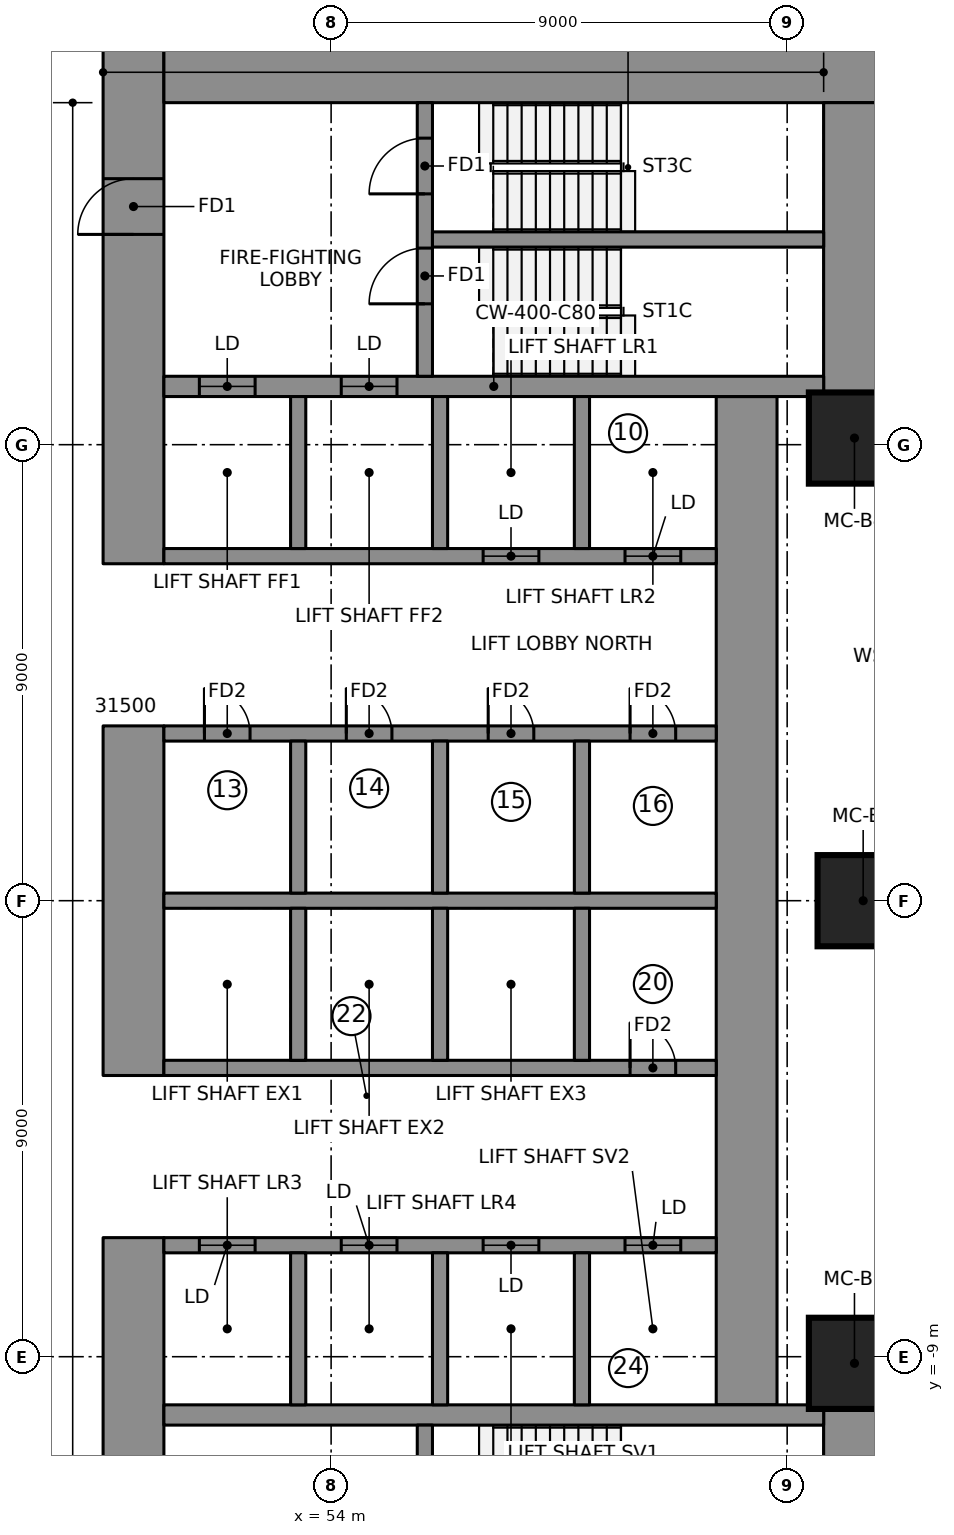
"""IFC4 building model, lengths in metres.
Left out: names, types, materials, properties, quantities, classifications, styles, units other than length and angle.
Written with IfcOpenShell. Run it as: python <this file> out.ifc"""

import sys

from ifc_helpers import new_model, si_unit, direction, frame, frame_2d, origin, origin_2d, place, context, subcontext, project, spatial, rectangle, extrude, element, fill, save


model = new_model("IFC4")
c1 = context("Model", 3, precision=1e-05, world=origin(), true_north=direction((0.0, 1.0)))
c2 = subcontext(c1, "Body", "Model", "MODEL_VIEW")
j1 = project(units=[si_unit("LENGTHUNIT", "METRE"), si_unit("PLANEANGLEUNIT", "RADIAN")], contexts=[c1])
p1 = place(None, origin())
s1 = spatial("IfcSite", under=j1, at=p1, CompositionType="ELEMENT")
p2 = place(p1, origin())
s2 = spatial("IfcBuilding", under=s1, at=p2, CompositionType="ELEMENT")
p3 = place(p2, frame((0.0, 0.0, 43.15)))
s3 = spatial("IfcBuildingStorey", under=s2, at=p3, CompositionType="ELEMENT", Elevation=43.15)
p4 = place(p3, frame((50.1, 6.65, 0.0), z_axis=(0.0, 0.0, 1.0), x_axis=(0.0, 1.0, 0.0)))
e1 = element("IfcWall", 1, at=p4, inside=s3, PredefinedType="SHEAR", context=c2, shape_type="SweptSolid", body=[
    extrude(rectangle(XDim=10.3, YDim=1.2, at=frame_2d((5.15, 0.0))), origin(), (0.0, 0.0, 1.0), 3.55),
])
p5 = place(p4, frame((6.5, 0.0, 0.0)))
e2 = element("IfcOpeningElement", 2, at=p5, cuts=e1, PredefinedType="OPENING", context=c2, shape_type="SweptSolid", body=[
    extrude(rectangle(XDim=1.1, YDim=2.1, at=frame_2d((0.55, 1.05))), frame((0.0, 0.61, 0.0), z_axis=(0.0, -1.0, 0.0), x_axis=(1.0, 0.0, 0.0)), (0.0, 0.0, 1.0), 1.22),
])
p6 = place(p3, frame((50.1, -3.45, 0.0), z_axis=(0.0, 0.0, 1.0), x_axis=(0.0, 1.0, 0.0)))
e3 = element("IfcWall", 3, at=p6, inside=s3, PredefinedType="SHEAR", context=c2, shape_type="SweptSolid", body=[
    extrude(rectangle(XDim=6.9, YDim=1.2, at=frame_2d((3.45, 0.0))), origin(), (0.0, 0.0, 1.0), 3.55),
])
p7 = place(p3, frame((50.1, -16.95, 0.0), z_axis=(0.0, 0.0, 1.0), x_axis=(0.0, 1.0, 0.0)))
e4 = element("IfcWall", 4, at=p7, inside=s3, PredefinedType="SHEAR", context=c2, shape_type="SweptSolid", body=[
    extrude(rectangle(XDim=10.3, YDim=1.2, at=frame_2d((5.15, 0.0))), origin(), (0.0, 0.0, 1.0), 3.55),
])
p8 = place(p7, frame((2.7, 0.0, 0.0)))
e5 = element("IfcOpeningElement", 5, at=p8, cuts=e4, PredefinedType="OPENING", context=c2, shape_type="SweptSolid", body=[
    extrude(rectangle(XDim=1.1, YDim=2.1, at=frame_2d((0.55, 1.05))), frame((0.0, 0.61, 0.0), z_axis=(0.0, -1.0, 0.0), x_axis=(1.0, 0.0, 0.0)), (0.0, 0.0, 1.0), 1.22),
])
p9 = place(p3, frame((50.7, 16.35, 0.0), z_axis=(0.0, 0.0, 1.0), x_axis=(1.0, 0.0, 0.0)))
e6 = element("IfcWall", 6, at=p9, inside=s3, PredefinedType="SHEAR", context=c2, shape_type="SweptSolid", body=[
    extrude(rectangle(XDim=14.22, YDim=1.2, at=frame_2d((7.11, 0.0))), origin(), (0.0, 0.0, 1.0), 3.55),
])
for number, where, z_axis, x_axis in (
    (7, (64.32, 9.95, 0.0), (0.0, 0.0, 1.0), (0.0, 1.0, 0.0)),
    (8, (64.32, -15.75, 0.0), (0.0, 0.0, 1.0), (0.0, 1.0, 0.0)),
):
    element("IfcWall", number, at=place(p3, frame(where, z_axis=z_axis, x_axis=x_axis)), inside=s3, PredefinedType="SHEAR", context=c2, shape_type="SweptSolid", body=[
        extrude(rectangle(XDim=5.8, YDim=1.2, at=frame_2d((2.9, 0.0))), origin(), (0.0, 0.0, 1.0), 3.55),
    ])
p10 = place(p3, frame((62.2, -9.95, 0.0), z_axis=(0.0, 0.0, 1.0), x_axis=(0.0, 1.0, 0.0)))
e9 = element("IfcWall", 9, at=p10, inside=s3, PredefinedType="SHEAR", context=c2, shape_type="SweptSolid", body=[
    extrude(rectangle(XDim=19.9, YDim=1.2, at=frame_2d((9.95, 0.0))), origin(), (0.0, 0.0, 1.0), 3.55),
])
p11 = place(p3, frame((50.7, 10.15, 0.0), z_axis=(0.0, 0.0, 1.0), x_axis=(1.0, 0.0, 0.0)))
e10 = element("IfcWall", 10, at=p11, inside=s3, PredefinedType="SHEAR", context=c2, shape_type="SweptSolid", body=[
    extrude(rectangle(XDim=13.02, YDim=0.4, at=frame_2d((6.51, 0.0))), origin(), (0.0, 0.0, 1.0), 3.55),
])
p12 = place(p11, frame((0.7, 0.0, 0.0)))
e11 = element("IfcOpeningElement", 11, at=p12, cuts=e10, PredefinedType="OPENING", context=c2, shape_type="SweptSolid", body=[
    extrude(rectangle(XDim=1.1, YDim=2.1, at=frame_2d((0.55, 1.05))), frame((0.0, 0.21, 0.0), z_axis=(0.0, -1.0, 0.0), x_axis=(1.0, 0.0, 0.0)), (0.0, 0.0, 1.0), 0.42),
])
p13 = place(p11, frame((3.5, 0.0, 0.0)))
e12 = element("IfcOpeningElement", 12, at=p13, cuts=e10, PredefinedType="OPENING", context=c2, shape_type="SweptSolid", body=[
    extrude(rectangle(XDim=1.1, YDim=2.1, at=frame_2d((0.55, 1.05))), frame((0.0, 0.21, 0.0), z_axis=(0.0, -1.0, 0.0), x_axis=(1.0, 0.0, 0.0)), (0.0, 0.0, 1.0), 0.42),
])
p14 = place(p3, frame((50.7, -10.15, 0.0), z_axis=(0.0, 0.0, 1.0), x_axis=(1.0, 0.0, 0.0)))
e13 = element("IfcWall", 13, at=p14, inside=s3, PredefinedType="SHEAR", context=c2, shape_type="SweptSolid", body=[
    extrude(rectangle(XDim=13.02, YDim=0.4, at=frame_2d((6.51, 0.0))), origin(), (0.0, 0.0, 1.0), 3.55),
])
p15 = place(p3, frame((50.7, 0.0, 0.0), z_axis=(0.0, 0.0, 1.0), x_axis=(1.0, 0.0, 0.0)))
e14 = element("IfcWall", 14, at=p15, inside=s3, PredefinedType="SHEAR", context=c2, shape_type="SweptSolid", body=[
    extrude(rectangle(XDim=10.9, YDim=0.3, at=frame_2d((5.45, 0.0))), origin(), (0.0, 0.0, 1.0), 3.55),
])
p16 = place(p3, frame((50.7, 3.3, 0.0), z_axis=(0.0, 0.0, 1.0), x_axis=(1.0, 0.0, 0.0)))
e15 = element("IfcWall", 15, at=p16, inside=s3, PredefinedType="SHEAR", context=c2, shape_type="SweptSolid", body=[
    extrude(rectangle(XDim=10.9, YDim=0.3, at=frame_2d((5.45, 0.0))), origin(), (0.0, 0.0, 1.0), 3.55),
])
p17 = place(p16, frame((0.8, 0.0, 0.0)))
e16 = element("IfcOpeningElement", 16, at=p17, cuts=e15, PredefinedType="OPENING", context=c2, shape_type="SweptSolid", body=[
    extrude(rectangle(XDim=0.9, YDim=2.1, at=frame_2d((0.45, 1.05))), frame((0.0, 0.16, 0.0), z_axis=(0.0, -1.0, 0.0), x_axis=(1.0, 0.0, 0.0)), (0.0, 0.0, 1.0), 0.32),
])
p18 = place(p16, frame((3.6, 0.0, 0.0)))
e17 = element("IfcOpeningElement", 17, at=p18, cuts=e15, PredefinedType="OPENING", context=c2, shape_type="SweptSolid", body=[
    extrude(rectangle(XDim=0.9, YDim=2.1, at=frame_2d((0.45, 1.05))), frame((0.0, 0.16, 0.0), z_axis=(0.0, -1.0, 0.0), x_axis=(1.0, 0.0, 0.0)), (0.0, 0.0, 1.0), 0.32),
])
p19 = place(p16, frame((6.4, 0.0, 0.0)))
e18 = element("IfcOpeningElement", 18, at=p19, cuts=e15, PredefinedType="OPENING", context=c2, shape_type="SweptSolid", body=[
    extrude(rectangle(XDim=0.9, YDim=2.1, at=frame_2d((0.45, 1.05))), frame((0.0, 0.16, 0.0), z_axis=(0.0, -1.0, 0.0), x_axis=(1.0, 0.0, 0.0)), (0.0, 0.0, 1.0), 0.32),
])
p20 = place(p16, frame((9.2, 0.0, 0.0)))
e19 = element("IfcOpeningElement", 19, at=p20, cuts=e15, PredefinedType="OPENING", context=c2, shape_type="SweptSolid", body=[
    extrude(rectangle(XDim=0.9, YDim=2.1, at=frame_2d((0.45, 1.05))), frame((0.0, 0.16, 0.0), z_axis=(0.0, -1.0, 0.0), x_axis=(1.0, 0.0, 0.0)), (0.0, 0.0, 1.0), 0.32),
])
p21 = place(p3, frame((50.7, 6.8, 0.0), z_axis=(0.0, 0.0, 1.0), x_axis=(1.0, 0.0, 0.0)))
e20 = element("IfcWall", 20, at=p21, inside=s3, PredefinedType="SHEAR", context=c2, shape_type="SweptSolid", body=[
    extrude(rectangle(XDim=10.9, YDim=0.3, at=frame_2d((5.45, 0.0))), origin(), (0.0, 0.0, 1.0), 3.55),
])
p22 = place(p21, frame((6.3, 0.0, 0.0)))
e21 = element("IfcOpeningElement", 21, at=p22, cuts=e20, PredefinedType="OPENING", context=c2, shape_type="SweptSolid", body=[
    extrude(rectangle(XDim=1.1, YDim=2.1, at=frame_2d((0.55, 1.05))), frame((0.0, 0.16, 0.0), z_axis=(0.0, -1.0, 0.0), x_axis=(1.0, 0.0, 0.0)), (0.0, 0.0, 1.0), 0.32),
])
p23 = place(p21, frame((9.1, 0.0, 0.0)))
e22 = element("IfcOpeningElement", 22, at=p23, cuts=e20, PredefinedType="OPENING", context=c2, shape_type="SweptSolid", body=[
    extrude(rectangle(XDim=1.1, YDim=2.1, at=frame_2d((0.55, 1.05))), frame((0.0, 0.16, 0.0), z_axis=(0.0, -1.0, 0.0), x_axis=(1.0, 0.0, 0.0)), (0.0, 0.0, 1.0), 0.32),
])
for number, where, z_axis, x_axis in (
    (23, (53.35, 0.15, 0.0), (0.0, 0.0, 1.0), (0.0, 1.0, 0.0)),
    (24, (53.35, 6.95, 0.0), (0.0, 0.0, 1.0), (0.0, 1.0, 0.0)),
    (25, (56.15, 0.15, 0.0), (0.0, 0.0, 1.0), (0.0, 1.0, 0.0)),
    (26, (56.15, 6.95, 0.0), (0.0, 0.0, 1.0), (0.0, 1.0, 0.0)),
    (27, (58.95, 0.15, 0.0), (0.0, 0.0, 1.0), (0.0, 1.0, 0.0)),
    (28, (58.95, 6.95, 0.0), (0.0, 0.0, 1.0), (0.0, 1.0, 0.0)),
):
    element("IfcWall", number, at=place(p3, frame(where, z_axis=z_axis, x_axis=x_axis)), inside=s3, PredefinedType="SHEAR", context=c2, shape_type="SweptSolid", body=[
        extrude(rectangle(XDim=3.0, YDim=0.3, at=frame_2d((1.5, 0.0))), origin(), (0.0, 0.0, 1.0), 3.55),
    ])
p24 = place(p3, frame((50.7, -3.3, 0.0), z_axis=(0.0, 0.0, 1.0), x_axis=(1.0, 0.0, 0.0)))
e29 = element("IfcWall", 29, at=p24, inside=s3, PredefinedType="SHEAR", context=c2, shape_type="SweptSolid", body=[
    extrude(rectangle(XDim=10.9, YDim=0.3, at=frame_2d((5.45, 0.0))), origin(), (0.0, 0.0, 1.0), 3.55),
])
p25 = place(p24, frame((9.2, 0.0, 0.0)))
e30 = element("IfcOpeningElement", 30, at=p25, cuts=e29, PredefinedType="OPENING", context=c2, shape_type="SweptSolid", body=[
    extrude(rectangle(XDim=0.9, YDim=2.1, at=frame_2d((0.45, 1.05))), frame((0.0, 0.16, 0.0), z_axis=(0.0, -1.0, 0.0), x_axis=(1.0, 0.0, 0.0)), (0.0, 0.0, 1.0), 0.32),
])
p26 = place(p3, frame((50.7, -6.8, 0.0), z_axis=(0.0, 0.0, 1.0), x_axis=(1.0, 0.0, 0.0)))
e31 = element("IfcWall", 31, at=p26, inside=s3, PredefinedType="SHEAR", context=c2, shape_type="SweptSolid", body=[
    extrude(rectangle(XDim=10.9, YDim=0.3, at=frame_2d((5.45, 0.0))), origin(), (0.0, 0.0, 1.0), 3.55),
])
p27 = place(p26, frame((0.7, 0.0, 0.0)))
e32 = element("IfcOpeningElement", 32, at=p27, cuts=e31, PredefinedType="OPENING", context=c2, shape_type="SweptSolid", body=[
    extrude(rectangle(XDim=1.1, YDim=2.1, at=frame_2d((0.55, 1.05))), frame((0.0, 0.16, 0.0), z_axis=(0.0, -1.0, 0.0), x_axis=(1.0, 0.0, 0.0)), (0.0, 0.0, 1.0), 0.32),
])
p28 = place(p26, frame((3.5, 0.0, 0.0)))
e33 = element("IfcOpeningElement", 33, at=p28, cuts=e31, PredefinedType="OPENING", context=c2, shape_type="SweptSolid", body=[
    extrude(rectangle(XDim=1.1, YDim=2.1, at=frame_2d((0.55, 1.05))), frame((0.0, 0.16, 0.0), z_axis=(0.0, -1.0, 0.0), x_axis=(1.0, 0.0, 0.0)), (0.0, 0.0, 1.0), 0.32),
])
p29 = place(p26, frame((6.3, 0.0, 0.0)))
e34 = element("IfcOpeningElement", 34, at=p29, cuts=e31, PredefinedType="OPENING", context=c2, shape_type="SweptSolid", body=[
    extrude(rectangle(XDim=1.1, YDim=2.1, at=frame_2d((0.55, 1.05))), frame((0.0, 0.16, 0.0), z_axis=(0.0, -1.0, 0.0), x_axis=(1.0, 0.0, 0.0)), (0.0, 0.0, 1.0), 0.32),
])
p30 = place(p26, frame((9.1, 0.0, 0.0)))
e35 = element("IfcOpeningElement", 35, at=p30, cuts=e31, PredefinedType="OPENING", context=c2, shape_type="SweptSolid", body=[
    extrude(rectangle(XDim=1.1, YDim=2.1, at=frame_2d((0.55, 1.05))), frame((0.0, 0.16, 0.0), z_axis=(0.0, -1.0, 0.0), x_axis=(1.0, 0.0, 0.0)), (0.0, 0.0, 1.0), 0.32),
])
for number, where, z_axis, x_axis in (
    (36, (53.35, -3.15, 0.0), (0.0, 0.0, 1.0), (0.0, 1.0, 0.0)),
    (37, (53.35, -9.95, 0.0), (0.0, 0.0, 1.0), (0.0, 1.0, 0.0)),
    (38, (56.15, -3.15, 0.0), (0.0, 0.0, 1.0), (0.0, 1.0, 0.0)),
    (39, (56.15, -9.95, 0.0), (0.0, 0.0, 1.0), (0.0, 1.0, 0.0)),
    (40, (58.95, -3.15, 0.0), (0.0, 0.0, 1.0), (0.0, 1.0, 0.0)),
    (41, (58.95, -9.95, 0.0), (0.0, 0.0, 1.0), (0.0, 1.0, 0.0)),
):
    element("IfcWall", number, at=place(p3, frame(where, z_axis=z_axis, x_axis=x_axis)), inside=s3, PredefinedType="SHEAR", context=c2, shape_type="SweptSolid", body=[
        extrude(rectangle(XDim=3.0, YDim=0.3, at=frame_2d((1.5, 0.0))), origin(), (0.0, 0.0, 1.0), 3.55),
    ])
p31 = place(p3, frame((55.85, 10.35, 0.0), z_axis=(0.0, 0.0, 1.0), x_axis=(0.0, 1.0, 0.0)))
e42 = element("IfcWall", 42, at=p31, inside=s3, PredefinedType="SHEAR", context=c2, shape_type="SweptSolid", body=[
    extrude(rectangle(XDim=5.4, YDim=0.3, at=frame_2d((2.7, 0.0))), origin(), (0.0, 0.0, 1.0), 3.55),
])
p32 = place(p31, frame((1.43, 0.0, 0.0)))
e43 = element("IfcOpeningElement", 43, at=p32, cuts=e42, PredefinedType="OPENING", context=c2, shape_type="SweptSolid", body=[
    extrude(rectangle(XDim=1.1, YDim=2.1, at=frame_2d((0.55, 1.05))), frame((0.0, 0.16, 0.0), z_axis=(0.0, -1.0, 0.0), x_axis=(1.0, 0.0, 0.0)), (0.0, 0.0, 1.0), 0.32),
])
p33 = place(p31, frame((3.6, 0.0, 0.0)))
e44 = element("IfcOpeningElement", 44, at=p33, cuts=e42, PredefinedType="OPENING", context=c2, shape_type="SweptSolid", body=[
    extrude(rectangle(XDim=1.1, YDim=2.1, at=frame_2d((0.55, 1.05))), frame((0.0, 0.16, 0.0), z_axis=(0.0, -1.0, 0.0), x_axis=(1.0, 0.0, 0.0)), (0.0, 0.0, 1.0), 0.32),
])
p34 = place(p3, frame((55.85, -15.75, 0.0), z_axis=(0.0, 0.0, 1.0), x_axis=(0.0, 1.0, 0.0)))
e45 = element("IfcWall", 45, at=p34, inside=s3, PredefinedType="SHEAR", context=c2, shape_type="SweptSolid", body=[
    extrude(rectangle(XDim=5.4, YDim=0.3, at=frame_2d((2.7, 0.0))), origin(), (0.0, 0.0, 1.0), 3.55),
])
p35 = place(p34, frame((3.6, 0.0, 0.0)))
e46 = element("IfcOpeningElement", 46, at=p35, cuts=e45, PredefinedType="OPENING", context=c2, shape_type="SweptSolid", body=[
    extrude(rectangle(XDim=1.1, YDim=2.1, at=frame_2d((0.55, 1.05))), frame((0.0, 0.16, 0.0), z_axis=(0.0, -1.0, 0.0), x_axis=(1.0, 0.0, 0.0)), (0.0, 0.0, 1.0), 0.32),
])
p36 = place(p34, frame((0.8, 0.0, 0.0)))
e47 = element("IfcOpeningElement", 47, at=p36, cuts=e45, PredefinedType="OPENING", context=c2, shape_type="SweptSolid", body=[
    extrude(rectangle(XDim=0.9, YDim=2.1, at=frame_2d((0.45, 1.05))), frame((0.0, 0.16, 0.0), z_axis=(0.0, -1.0, 0.0), x_axis=(1.0, 0.0, 0.0)), (0.0, 0.0, 1.0), 0.32),
])
p37 = place(p3, frame((56.0, 13.05, 0.0), z_axis=(0.0, 0.0, 1.0), x_axis=(1.0, 0.0, 0.0)))
e48 = element("IfcWall", 48, at=p37, inside=s3, PredefinedType="SHEAR", context=c2, shape_type="SweptSolid", body=[
    extrude(rectangle(XDim=7.72, YDim=0.3, at=frame_2d((3.86, 0.0))), origin(), (0.0, 0.0, 1.0), 3.55),
])
for number, where, z_axis, x_axis in (
    (49, (64.328, -9.131, 0.0), (0.0, 0.0, 1.0), (1.0, 0.0, 0.0)),
    (50, (64.5, 0.0, 0.0), (0.0, 0.0, 1.0), (1.0, 0.0, 0.0)),
    (51, (64.328, 9.131, 0.0), (0.0, 0.0, 1.0), (1.0, 0.0, 0.0)),
):
    element("IfcColumn", number, at=place(p3, frame(where, z_axis=z_axis, x_axis=x_axis)), inside=s3, PredefinedType="COLUMN", context=c2, shape_type="SweptSolid", body=[
        extrude(rectangle(XDim=1.8, YDim=1.8, at=origin_2d()), origin(), (0.0, 0.0, 1.0), 3.55),
    ])
p38 = place(p12, origin())
e52 = element("IfcDoor", 52, at=p38, inside=s3, OperationType="DOUBLE_DOOR_SLIDING", PredefinedType="DOOR", context=c2, shape_type="SweptSolid", body=[
    extrude(rectangle(XDim=1.1, YDim=2.1, at=frame_2d((0.55, 1.05))), frame((0.0, 0.025, 0.0), z_axis=(0.0, -1.0, 0.0), x_axis=(1.0, 0.0, 0.0)), (0.0, 0.0, 1.0), 0.05),
])
fill(e11, e52)
p39 = place(p13, origin())
e53 = element("IfcDoor", 53, at=p39, inside=s3, OperationType="DOUBLE_DOOR_SLIDING", PredefinedType="DOOR", context=c2, shape_type="SweptSolid", body=[
    extrude(rectangle(XDim=1.1, YDim=2.1, at=frame_2d((0.55, 1.05))), frame((0.0, 0.025, 0.0), z_axis=(0.0, -1.0, 0.0), x_axis=(1.0, 0.0, 0.0)), (0.0, 0.0, 1.0), 0.05),
])
fill(e12, e53)
p40 = place(p22, origin())
e54 = element("IfcDoor", 54, at=p40, inside=s3, OperationType="DOUBLE_DOOR_SLIDING", PredefinedType="DOOR", context=c2, shape_type="SweptSolid", body=[
    extrude(rectangle(XDim=1.1, YDim=2.1, at=frame_2d((0.55, 1.05))), frame((0.0, 0.025, 0.0), z_axis=(0.0, -1.0, 0.0), x_axis=(1.0, 0.0, 0.0)), (0.0, 0.0, 1.0), 0.05),
])
fill(e21, e54)
p41 = place(p23, origin())
e55 = element("IfcDoor", 55, at=p41, inside=s3, OperationType="DOUBLE_DOOR_SLIDING", PredefinedType="DOOR", context=c2, shape_type="SweptSolid", body=[
    extrude(rectangle(XDim=1.1, YDim=2.1, at=frame_2d((0.55, 1.05))), frame((0.0, 0.025, 0.0), z_axis=(0.0, -1.0, 0.0), x_axis=(1.0, 0.0, 0.0)), (0.0, 0.0, 1.0), 0.05),
])
fill(e22, e55)
p42 = place(p27, origin())
e56 = element("IfcDoor", 56, at=p42, inside=s3, OperationType="DOUBLE_DOOR_SLIDING", PredefinedType="DOOR", context=c2, shape_type="SweptSolid", body=[
    extrude(rectangle(XDim=1.1, YDim=2.1, at=frame_2d((0.55, 1.05))), frame((0.0, 0.025, 0.0), z_axis=(0.0, -1.0, 0.0), x_axis=(1.0, 0.0, 0.0)), (0.0, 0.0, 1.0), 0.05),
])
fill(e32, e56)
p43 = place(p28, origin())
e57 = element("IfcDoor", 57, at=p43, inside=s3, OperationType="DOUBLE_DOOR_SLIDING", PredefinedType="DOOR", context=c2, shape_type="SweptSolid", body=[
    extrude(rectangle(XDim=1.1, YDim=2.1, at=frame_2d((0.55, 1.05))), frame((0.0, 0.025, 0.0), z_axis=(0.0, -1.0, 0.0), x_axis=(1.0, 0.0, 0.0)), (0.0, 0.0, 1.0), 0.05),
])
fill(e33, e57)
p44 = place(p29, origin())
e58 = element("IfcDoor", 58, at=p44, inside=s3, OperationType="DOUBLE_DOOR_SLIDING", PredefinedType="DOOR", context=c2, shape_type="SweptSolid", body=[
    extrude(rectangle(XDim=1.1, YDim=2.1, at=frame_2d((0.55, 1.05))), frame((0.0, 0.025, 0.0), z_axis=(0.0, -1.0, 0.0), x_axis=(1.0, 0.0, 0.0)), (0.0, 0.0, 1.0), 0.05),
])
fill(e34, e58)
p45 = place(p30, origin())
e59 = element("IfcDoor", 59, at=p45, inside=s3, OperationType="DOUBLE_DOOR_SLIDING", PredefinedType="DOOR", context=c2, shape_type="SweptSolid", body=[
    extrude(rectangle(XDim=1.1, YDim=2.1, at=frame_2d((0.55, 1.05))), frame((0.0, 0.025, 0.0), z_axis=(0.0, -1.0, 0.0), x_axis=(1.0, 0.0, 0.0)), (0.0, 0.0, 1.0), 0.05),
])
fill(e35, e59)
p46 = place(p32, origin())
e60 = element("IfcDoor", 60, at=p46, inside=s3, OperationType="SINGLE_SWING_RIGHT", PredefinedType="DOOR", context=c2, shape_type="SweptSolid", body=[
    extrude(rectangle(XDim=1.1, YDim=2.1, at=frame_2d((0.55, 1.05))), frame((0.0, 0.025, 0.0), z_axis=(0.0, -1.0, 0.0), x_axis=(1.0, 0.0, 0.0)), (0.0, 0.0, 1.0), 0.05),
])
fill(e43, e60)
p47 = place(p33, origin())
e61 = element("IfcDoor", 61, at=p47, inside=s3, OperationType="SINGLE_SWING_RIGHT", PredefinedType="DOOR", context=c2, shape_type="SweptSolid", body=[
    extrude(rectangle(XDim=1.1, YDim=2.1, at=frame_2d((0.55, 1.05))), frame((0.0, 0.025, 0.0), z_axis=(0.0, -1.0, 0.0), x_axis=(1.0, 0.0, 0.0)), (0.0, 0.0, 1.0), 0.05),
])
fill(e44, e61)
p48 = place(p5, origin())
e62 = element("IfcDoor", 62, at=p48, inside=s3, OperationType="SINGLE_SWING_RIGHT", PredefinedType="DOOR", context=c2, shape_type="SweptSolid", body=[
    extrude(rectangle(XDim=1.1, YDim=2.1, at=frame_2d((0.55, 1.05))), frame((0.0, 0.025, 0.0), z_axis=(0.0, -1.0, 0.0), x_axis=(1.0, 0.0, 0.0)), (0.0, 0.0, 1.0), 0.05),
])
fill(e2, e62)
p49 = place(p17, origin())
e63 = element("IfcDoor", 63, at=p49, inside=s3, OperationType="SINGLE_SWING_LEFT", PredefinedType="DOOR", context=c2, shape_type="SweptSolid", body=[
    extrude(rectangle(XDim=0.9, YDim=2.1, at=frame_2d((0.45, 1.05))), frame((0.0, 0.025, 0.0), z_axis=(0.0, -1.0, 0.0), x_axis=(1.0, 0.0, 0.0)), (0.0, 0.0, 1.0), 0.05),
])
fill(e16, e63)
p50 = place(p18, origin())
e64 = element("IfcDoor", 64, at=p50, inside=s3, OperationType="SINGLE_SWING_LEFT", PredefinedType="DOOR", context=c2, shape_type="SweptSolid", body=[
    extrude(rectangle(XDim=0.9, YDim=2.1, at=frame_2d((0.45, 1.05))), frame((0.0, 0.025, 0.0), z_axis=(0.0, -1.0, 0.0), x_axis=(1.0, 0.0, 0.0)), (0.0, 0.0, 1.0), 0.05),
])
fill(e17, e64)
p51 = place(p19, origin())
e65 = element("IfcDoor", 65, at=p51, inside=s3, OperationType="SINGLE_SWING_LEFT", PredefinedType="DOOR", context=c2, shape_type="SweptSolid", body=[
    extrude(rectangle(XDim=0.9, YDim=2.1, at=frame_2d((0.45, 1.05))), frame((0.0, 0.025, 0.0), z_axis=(0.0, -1.0, 0.0), x_axis=(1.0, 0.0, 0.0)), (0.0, 0.0, 1.0), 0.05),
])
fill(e18, e65)
p52 = place(p20, origin())
e66 = element("IfcDoor", 66, at=p52, inside=s3, OperationType="SINGLE_SWING_LEFT", PredefinedType="DOOR", context=c2, shape_type="SweptSolid", body=[
    extrude(rectangle(XDim=0.9, YDim=2.1, at=frame_2d((0.45, 1.05))), frame((0.0, 0.025, 0.0), z_axis=(0.0, -1.0, 0.0), x_axis=(1.0, 0.0, 0.0)), (0.0, 0.0, 1.0), 0.05),
])
fill(e19, e66)
p53 = place(p25, origin())
e67 = element("IfcDoor", 67, at=p53, inside=s3, OperationType="SINGLE_SWING_LEFT", PredefinedType="DOOR", context=c2, shape_type="SweptSolid", body=[
    extrude(rectangle(XDim=0.9, YDim=2.1, at=frame_2d((0.45, 1.05))), frame((0.0, 0.025, 0.0), z_axis=(0.0, -1.0, 0.0), x_axis=(1.0, 0.0, 0.0)), (0.0, 0.0, 1.0), 0.05),
])
fill(e30, e67)
save(model, sys.argv[1])
